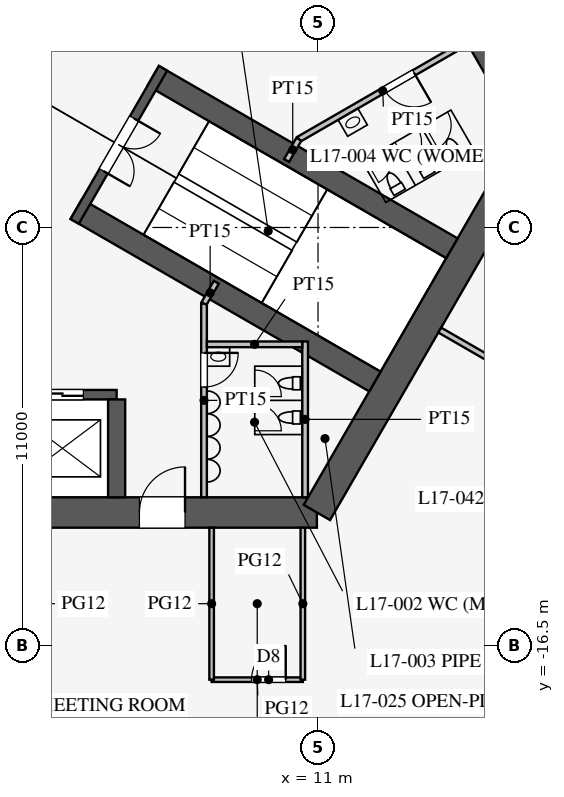
"""IFC4 building model, lengths in metres.
Left out: names, types, materials, properties, quantities, classifications, styles, units other than length and angle.
Written with IfcOpenShell. Run it as: python <this file> out.ifc"""

import sys

from ifc_helpers import new_model, si_unit, direction, frame, frame_2d, origin, place, context, subcontext, project, spatial, rectangle, extrude, element, fill, save


model = new_model("IFC4")
c1 = context("Model", 3, precision=1e-05, world=origin(), true_north=direction((0.0, 1.0)))
c2 = subcontext(c1, "Body", "Model", "MODEL_VIEW")
j1 = project(units=[si_unit("LENGTHUNIT", "METRE"), si_unit("PLANEANGLEUNIT", "RADIAN")], contexts=[c1])
p1 = place(None, origin())
s1 = spatial("IfcSite", under=j1, at=p1, CompositionType="ELEMENT")
p2 = place(p1, origin())
s2 = spatial("IfcBuilding", under=s1, at=p2, CompositionType="ELEMENT")
p3 = place(p2, frame((0.0, 0.0, 75.3)))
s3 = spatial("IfcBuildingStorey", under=s2, at=p3, CompositionType="ELEMENT", Elevation=75.3)
p4 = place(p3, frame((-10.97, -13.0, 0.0), z_axis=(0.0, 0.0, 1.0), x_axis=(1.0, 0.0, 0.0)))
e1 = element("IfcWall", 1, at=p4, inside=s3, PredefinedType="SHEAR", context=c2, shape_type="SweptSolid", body=[
    extrude(rectangle(XDim=21.939, YDim=0.8, at=frame_2d((10.97, 0.0))), origin(), (0.0, 0.0, 1.0), 4.2),
])
p5 = place(p4, frame((17.27, 0.0, 0.0)))
e2 = element("IfcOpeningElement", 2, at=p5, cuts=e1, PredefinedType="OPENING", context=c2, shape_type="SweptSolid", body=[
    extrude(rectangle(XDim=1.2, YDim=2.1, at=frame_2d((0.6, 1.05))), frame((0.0, 0.41, 0.0), z_axis=(0.0, -1.0, 0.0), x_axis=(1.0, 0.0, 0.0)), (0.0, 0.0, 1.0), 0.82),
])
p6 = place(p4, frame((3.47, 0.0, 0.0)))
e3 = element("IfcOpeningElement", 3, at=p6, cuts=e1, PredefinedType="OPENING", context=c2, shape_type="SweptSolid", body=[
    extrude(rectangle(XDim=1.2, YDim=2.1, at=frame_2d((0.6, 1.05))), frame((0.0, 0.41, 0.0), z_axis=(0.0, -1.0, 0.0), x_axis=(1.0, 0.0, 0.0)), (0.0, 0.0, 1.0), 0.82),
])
p7 = place(p3, frame((10.97, -13.0, 0.0), z_axis=(0.0, 0.0, 1.0), x_axis=(0.499995765644, 0.866027848477, 0.0)))
e4 = element("IfcWall", 4, at=p7, inside=s3, PredefinedType="SHEAR", context=c2, shape_type="SweptSolid", body=[
    extrude(rectangle(XDim=11.547, YDim=0.8, at=frame_2d((5.773, 0.0))), origin(), (0.0, 0.0, 1.0), 4.2),
])
p8 = place(p3, frame((16.743, -3.0, 0.0), z_axis=(0.0, 0.0, 1.0), x_axis=(-0.500002442456, 0.866023993627, 0.0)))
e5 = element("IfcWall", 5, at=p8, inside=s3, PredefinedType="SHEAR", context=c2, shape_type="SweptSolid", body=[
    extrude(rectangle(XDim=21.939, YDim=0.8, at=frame_2d((10.97, 0.0))), origin(), (0.0, 0.0, 1.0), 4.2),
])
p9 = place(p8, frame((17.27, 0.0, 0.0)))
e6 = element("IfcOpeningElement", 6, at=p9, cuts=e5, PredefinedType="OPENING", context=c2, shape_type="SweptSolid", body=[
    extrude(rectangle(XDim=1.2, YDim=2.1, at=frame_2d((0.6, 1.05))), frame((0.0, 0.41, 0.0), z_axis=(0.0, -1.0, 0.0), x_axis=(1.0, 0.0, 0.0)), (0.0, 0.0, 1.0), 0.82),
])
p10 = place(p8, frame((3.47, 0.0, 0.0)))
e7 = element("IfcOpeningElement", 7, at=p10, cuts=e5, PredefinedType="OPENING", context=c2, shape_type="SweptSolid", body=[
    extrude(rectangle(XDim=1.2, YDim=2.1, at=frame_2d((0.6, 1.05))), frame((0.0, 0.41, 0.0), z_axis=(0.0, -1.0, 0.0), x_axis=(1.0, 0.0, 0.0)), (0.0, 0.0, 1.0), 0.82),
])
p11 = place(p3, frame((-5.7, -9.9, 0.0), z_axis=(0.0, 0.0, 1.0), x_axis=(1.0, 0.0, 0.0)))
e8 = element("IfcWall", 8, at=p11, inside=s3, PredefinedType="SHEAR", context=c2, shape_type="SweptSolid", body=[
    extrude(rectangle(XDim=11.4, YDim=0.25, at=frame_2d((5.7, 0.0))), origin(), (0.0, 0.0, 1.0), 4.2),
])
p12 = place(p11, frame((0.875, 0.0, 0.0)))
e9 = element("IfcOpeningElement", 9, at=p12, cuts=e8, PredefinedType="OPENING", context=c2, shape_type="SweptSolid", body=[
    extrude(rectangle(XDim=1.1, YDim=2.2, at=frame_2d((0.55, 1.1))), frame((0.0, 0.135, 0.0), z_axis=(0.0, -1.0, 0.0), x_axis=(1.0, 0.0, 0.0)), (0.0, 0.0, 1.0), 0.27),
])
p13 = place(p11, frame((3.725, 0.0, 0.0)))
e10 = element("IfcOpeningElement", 10, at=p13, cuts=e8, PredefinedType="OPENING", context=c2, shape_type="SweptSolid", body=[
    extrude(rectangle(XDim=1.1, YDim=2.2, at=frame_2d((0.55, 1.1))), frame((0.0, 0.135, 0.0), z_axis=(0.0, -1.0, 0.0), x_axis=(1.0, 0.0, 0.0)), (0.0, 0.0, 1.0), 0.27),
])
p14 = place(p11, frame((6.575, 0.0, 0.0)))
e11 = element("IfcOpeningElement", 11, at=p14, cuts=e8, PredefinedType="OPENING", context=c2, shape_type="SweptSolid", body=[
    extrude(rectangle(XDim=1.1, YDim=2.2, at=frame_2d((0.55, 1.1))), frame((0.0, 0.135, 0.0), z_axis=(0.0, -1.0, 0.0), x_axis=(1.0, 0.0, 0.0)), (0.0, 0.0, 1.0), 0.27),
])
p15 = place(p11, frame((9.425, 0.0, 0.0)))
e12 = element("IfcOpeningElement", 12, at=p15, cuts=e8, PredefinedType="OPENING", context=c2, shape_type="SweptSolid", body=[
    extrude(rectangle(XDim=1.1, YDim=2.2, at=frame_2d((0.55, 1.1))), frame((0.0, 0.135, 0.0), z_axis=(0.0, -1.0, 0.0), x_axis=(1.0, 0.0, 0.0)), (0.0, 0.0, 1.0), 0.27),
])
p16 = place(p3, frame((5.7, -10.025, 0.0), z_axis=(0.0, 0.0, 1.0), x_axis=(0.0, -1.0, 0.0)))
e13 = element("IfcWall", 13, at=p16, inside=s3, PredefinedType="SHEAR", context=c2, shape_type="SweptSolid", body=[
    extrude(rectangle(XDim=2.575, YDim=0.45, at=frame_2d((1.288, 0.0))), origin(), (0.0, 0.0, 1.0), 4.2),
])
for number, where, z_axis, x_axis in (
    (14, (4.638, -5.016, 0.0), (0.0, 0.0, 1.0), (0.866, -0.5, 0.0)),
    (15, (6.663, -1.509, 0.0), (0.0, 0.0, 1.0), (0.866, -0.5, 0.0)),
):
    element("IfcWall", number, at=place(p3, frame(where, z_axis=z_axis, x_axis=x_axis)), inside=s3, PredefinedType="SHEAR", context=c2, shape_type="SweptSolid", body=[
        extrude(rectangle(XDim=9.075, YDim=0.6, at=frame_2d((4.538, 0.0))), origin(), (0.0, 0.0, 1.0), 4.2),
    ])
p17 = place(p3, frame((4.597, -5.339, 0.0), z_axis=(0.0, 0.0, 1.0), x_axis=(0.499984536904, 0.866034331223, 0.0)))
e16 = element("IfcWall", 16, at=p17, inside=s3, PredefinedType="SHEAR", context=c2, shape_type="SweptSolid", body=[
    extrude(rectangle(XDim=4.65, YDim=0.25, at=frame_2d((2.325, 0.0))), origin(), (0.0, 0.0, 1.0), 4.2),
])
p18 = place(p17, frame((1.525, 0.0, 0.0)))
e17 = element("IfcOpeningElement", 17, at=p18, cuts=e16, PredefinedType="OPENING", context=c2, shape_type="SweptSolid", body=[
    extrude(rectangle(XDim=1.6, YDim=2.1, at=frame_2d((0.8, 1.05))), frame((0.0, 0.135, 0.0), z_axis=(0.0, -1.0, 0.0), x_axis=(1.0, 0.0, 0.0)), (0.0, 0.0, 1.0), 0.27),
])
p19 = place(p3, frame((8.0, -7.5, 0.0), z_axis=(0.0, 0.0, 1.0), x_axis=(0.0, -1.0, 0.0)))
e18 = element("IfcWall", 18, at=p19, inside=s3, PredefinedType="PARTITIONING", context=c2, shape_type="SweptSolid", body=[
    extrude(rectangle(XDim=5.1, YDim=0.15, at=frame_2d((2.55, 0.0))), origin(), (0.0, 0.0, 1.0), 4.0),
])
p20 = place(p19, frame((1.3, 0.0, 0.0)))
e19 = element("IfcOpeningElement", 19, at=p20, cuts=e18, PredefinedType="OPENING", context=c2, shape_type="SweptSolid", body=[
    extrude(rectangle(XDim=0.9, YDim=2.1, at=frame_2d((0.45, 1.05))), frame((0.0, 0.085, 0.0), z_axis=(0.0, -1.0, 0.0), x_axis=(1.0, 0.0, 0.0)), (0.0, 0.0, 1.0), 0.17),
])
p21 = place(p3, frame((10.495, -3.178, 0.0), z_axis=(0.0, 0.0, 1.0), x_axis=(0.86602216432, 0.500005610874, 0.0)))
e20 = element("IfcWall", 20, at=p21, inside=s3, PredefinedType="PARTITIONING", context=c2, shape_type="SweptSolid", body=[
    extrude(rectangle(XDim=5.1, YDim=0.15, at=frame_2d((2.55, 0.0))), origin(), (0.0, 0.0, 1.0), 4.0),
])
p22 = place(p21, frame((2.6, 0.0, 0.0)))
e21 = element("IfcOpeningElement", 21, at=p22, cuts=e20, PredefinedType="OPENING", context=c2, shape_type="SweptSolid", body=[
    extrude(rectangle(XDim=0.9, YDim=2.1, at=frame_2d((0.45, 1.05))), frame((0.0, 0.085, 0.0), z_axis=(0.0, -1.0, 0.0), x_axis=(1.0, 0.0, 0.0)), (0.0, 0.0, 1.0), 0.17),
])
for number, where, z_axis, x_axis in (
    (22, (8.0, -7.5, 0.0), (0.0, 0.0, 1.0), (0.5, 0.866, 0.0)),
    (23, (10.495, -3.178, 0.0), (0.0, 0.0, 1.0), (-0.5, -0.866, 0.0)),
):
    element("IfcWall", number, at=place(p3, frame(where, z_axis=z_axis, x_axis=x_axis)), inside=s3, PredefinedType="PARTITIONING", context=c2, shape_type="SweptSolid", body=[
        extrude(rectangle(XDim=0.645, YDim=0.15, at=frame_2d((0.323, 0.0))), origin(), (0.0, 0.0, 1.0), 4.0),
    ])
p23 = place(p3, frame((10.66, -8.5, 0.0), z_axis=(0.0, 0.0, 1.0), x_axis=(0.0, -1.0, 0.0)))
e24 = element("IfcWall", 24, at=p23, inside=s3, PredefinedType="PARTITIONING", context=c2, shape_type="SweptSolid", body=[
    extrude(rectangle(XDim=4.1, YDim=0.15, at=frame_2d((2.05, 0.0))), origin(), (0.0, 0.0, 1.0), 4.0),
])
p24 = place(p3, frame((8.075, -8.575, 0.0), z_axis=(0.0, 0.0, 1.0), x_axis=(1.0, 0.0, 0.0)))
e25 = element("IfcWall", 25, at=p24, inside=s3, PredefinedType="PARTITIONING", context=c2, shape_type="SweptSolid", body=[
    extrude(rectangle(XDim=2.51, YDim=0.15, at=frame_2d((1.255, 0.0))), origin(), (0.0, 0.0, 1.0), 4.0),
])
p25 = place(p3, frame((14.203, -8.2, 0.0), z_axis=(0.0, 0.0, 1.0), x_axis=(0.866024965723, -0.500000758745, 0.0)))
e26 = element("IfcWall", 26, at=p25, inside=s3, PredefinedType="PARTITIONING", context=c2, shape_type="SweptSolid", body=[
    extrude(rectangle(XDim=18.25, YDim=0.15, at=frame_2d((9.125, 0.0))), origin(), (0.0, 0.0, 1.0), 2.3),
])
p26 = place(p3, frame((8.2, -17.4, 0.0), z_axis=(0.0, 0.0, 1.0), x_axis=(1.0, 0.0, 0.0)))
e27 = element("IfcWall", 27, at=p26, inside=s3, PredefinedType="PARTITIONING", context=c2, shape_type="SweptSolid", body=[
    extrude(rectangle(XDim=2.4, YDim=0.12, at=frame_2d((1.2, 0.0))), origin(), (0.0, 0.0, 1.0), 2.9),
])
p27 = place(p26, frame((1.05, 0.0, 0.15)))
e28 = element("IfcOpeningElement", 28, at=p27, cuts=e27, PredefinedType="OPENING", context=c2, shape_type="SweptSolid", body=[
    extrude(rectangle(XDim=0.9, YDim=2.1, at=frame_2d((0.45, 1.05))), frame((0.0, 0.07, 0.0), z_axis=(0.0, -1.0, 0.0), x_axis=(1.0, 0.0, 0.0)), (0.0, 0.0, 1.0), 0.14),
])
for number, where, z_axis, x_axis in (
    (29, (10.6, -13.4, 0.0), (0.0, 0.0, 1.0), (0.0, -1.0, 0.0)),
    (30, (8.2, -13.4, 0.0), (0.0, 0.0, 1.0), (0.0, -1.0, 0.0)),
):
    element("IfcWall", number, at=place(p3, frame(where, z_axis=z_axis, x_axis=x_axis)), inside=s3, PredefinedType="PARTITIONING", context=c2, shape_type="SweptSolid", body=[
        extrude(rectangle(XDim=4.0, YDim=0.12, at=frame_2d((2.0, 0.0))), origin(), (0.0, 0.0, 1.0), 2.9),
    ])
p28 = place(p3, frame((26.415, -15.231, 0.0), z_axis=(0.0, 0.0, 1.0), x_axis=(-0.50000091641, 0.866024874695, 0.0)))
e31 = element("IfcWall", 31, at=p28, inside=s3, PredefinedType="PARTITIONING", context=c2, shape_type="SweptSolid", body=[
    extrude(rectangle(XDim=52.796, YDim=0.12, at=frame_2d((26.398, 0.0))), origin(), (0.0, 0.0, 1.0), 2.9),
])
p29 = place(p28, frame((10.2, 0.0, 0.15)))
e32 = element("IfcOpeningElement", 32, at=p29, cuts=e31, PredefinedType="OPENING", context=c2, shape_type="SweptSolid", body=[
    extrude(rectangle(XDim=1.8, YDim=2.1, at=frame_2d((0.9, 1.05))), frame((0.0, 0.07, 0.0), z_axis=(0.0, -1.0, 0.0), x_axis=(1.0, 0.0, 0.0)), (0.0, 0.0, 1.0), 0.14),
])
p30 = place(p28, frame((40.8, 0.0, 0.15)))
e33 = element("IfcOpeningElement", 33, at=p30, cuts=e31, PredefinedType="OPENING", context=c2, shape_type="SweptSolid", body=[
    extrude(rectangle(XDim=1.8, YDim=2.1, at=frame_2d((0.9, 1.05))), frame((0.0, 0.07, 0.0), z_axis=(0.0, -1.0, 0.0), x_axis=(1.0, 0.0, 0.0)), (0.0, 0.0, 1.0), 0.14),
])
p31 = place(p20, origin())
e34 = element("IfcDoor", 34, at=p31, inside=s3, OperationType="SINGLE_SWING_LEFT", PredefinedType="DOOR", context=c2, shape_type="SweptSolid", body=[
    extrude(rectangle(XDim=0.9, YDim=2.1, at=frame_2d((0.45, 1.05))), frame((0.0, 0.025, 0.0), z_axis=(0.0, -1.0, 0.0), x_axis=(1.0, 0.0, 0.0)), (0.0, 0.0, 1.0), 0.05),
])
fill(e19, e34)
p32 = place(p22, frame((0.9, 0.0, 0.0), z_axis=(0.0, 0.0, 1.0), x_axis=(-1.0, 0.0, 0.0)))
e35 = element("IfcDoor", 35, at=p32, inside=s3, OperationType="SINGLE_SWING_LEFT", PredefinedType="DOOR", context=c2, shape_type="SweptSolid", body=[
    extrude(rectangle(XDim=0.9, YDim=2.1, at=frame_2d((0.45, 1.05))), frame((0.0, 0.025, 0.0), z_axis=(0.0, -1.0, 0.0), x_axis=(1.0, 0.0, 0.0)), (0.0, 0.0, 1.0), 0.05),
])
fill(e21, e35)
p33 = place(p18, frame((1.6, 0.0, 0.0), z_axis=(0.0, 0.0, 1.0), x_axis=(-1.0, 0.0, 0.0)))
e36 = element("IfcDoor", 36, at=p33, inside=s3, OperationType="DOUBLE_DOOR_SINGLE_SWING", PredefinedType="DOOR", context=c2, shape_type="SweptSolid", body=[
    extrude(rectangle(XDim=1.6, YDim=2.1, at=frame_2d((0.8, 1.05))), frame((0.0, 0.025, 0.0), z_axis=(0.0, -1.0, 0.0), x_axis=(1.0, 0.0, 0.0)), (0.0, 0.0, 1.0), 0.05),
])
fill(e17, e36)
p34 = place(p5, origin())
e37 = element("IfcDoor", 37, at=p34, inside=s3, OperationType="SINGLE_SWING_RIGHT", PredefinedType="DOOR", context=c2, shape_type="SweptSolid", body=[
    extrude(rectangle(XDim=1.2, YDim=2.1, at=frame_2d((0.6, 1.05))), frame((0.0, 0.025, 0.0), z_axis=(0.0, -1.0, 0.0), x_axis=(1.0, 0.0, 0.0)), (0.0, 0.0, 1.0), 0.05),
])
fill(e2, e37)
p35 = place(p27, origin())
e38 = element("IfcDoor", 38, at=p35, inside=s3, OperationType="SINGLE_SWING_RIGHT", PredefinedType="DOOR", context=c2, shape_type="SweptSolid", body=[
    extrude(rectangle(XDim=0.9, YDim=2.1, at=frame_2d((0.45, 1.05))), frame((0.0, 0.025, 0.0), z_axis=(0.0, -1.0, 0.0), x_axis=(1.0, 0.0, 0.0)), (0.0, 0.0, 1.0), 0.05),
])
fill(e28, e38)
p36 = place(p15, origin())
e39 = element("IfcDoor", 39, at=p36, inside=s3, OperationType="DOUBLE_DOOR_SLIDING", PredefinedType="DOOR", context=c2, shape_type="SweptSolid", body=[
    extrude(rectangle(XDim=1.1, YDim=2.2, at=frame_2d((0.55, 1.1))), frame((0.0, 0.025, 0.0), z_axis=(0.0, -1.0, 0.0), x_axis=(1.0, 0.0, 0.0)), (0.0, 0.0, 1.0), 0.05),
])
fill(e12, e39)
save(model, sys.argv[1])
